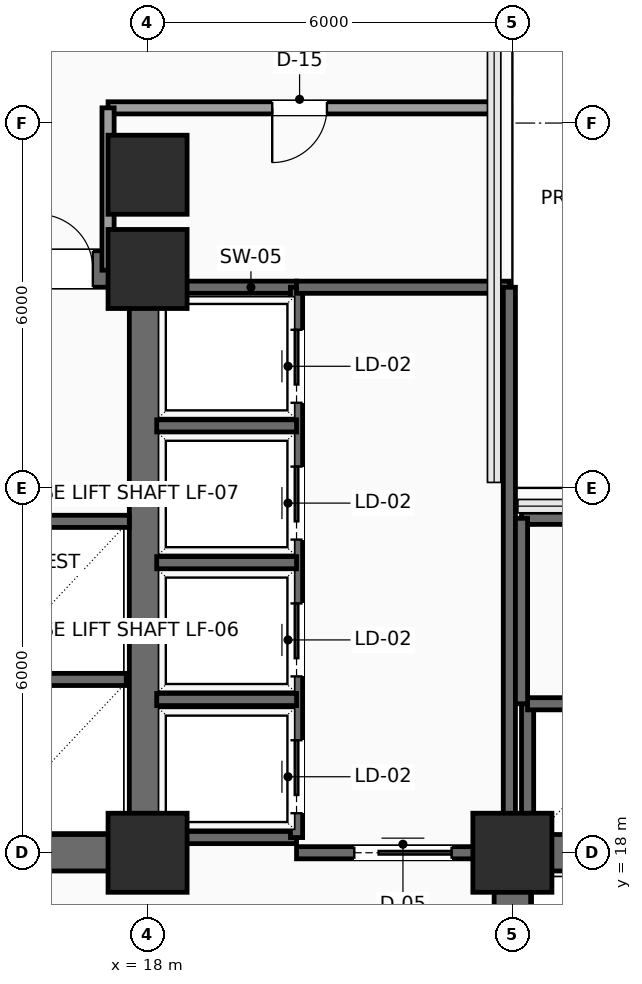
"""IFC4 building model, lengths in metres.
Left out: names, types, materials, properties, quantities, classifications, styles, units other than length and angle.
Written with IfcOpenShell. Run it as: python <this file> out.ifc"""

import sys

from ifc_helpers import new_model, si_unit, direction, frame, frame_2d, origin, origin_2d, place, context, subcontext, project, spatial, rectangle, extrude, element, fill, save


model = new_model("IFC4")
c1 = context("Model", 3, precision=1e-05, world=origin(), true_north=direction((0.0, 1.0)))
c2 = subcontext(c1, "Body", "Model", "MODEL_VIEW")
j1 = project(units=[si_unit("LENGTHUNIT", "METRE"), si_unit("PLANEANGLEUNIT", "RADIAN")], contexts=[c1])
p1 = place(None, origin())
s1 = spatial("IfcSite", under=j1, at=p1, CompositionType="ELEMENT")
p2 = place(p1, origin())
s2 = spatial("IfcBuilding", under=s1, at=p2, CompositionType="ELEMENT")
p3 = place(p2, frame((0.0, 0.0, 90.9)))
s3 = spatial("IfcBuildingStorey", under=s2, at=p3, CompositionType="ELEMENT", Elevation=90.9)
for number, where, z_axis, x_axis in (
    (1, (18.0, 18.0, 0.0), (0.0, 0.0, 1.0), (1.0, 0.0, 0.0)),
    (2, (18.0, 27.6, 0.0), (0.0, 0.0, 1.0), (1.0, 0.0, 0.0)),
    (3, (24.0, 18.0, 0.0), (0.0, 0.0, 1.0), (1.0, 0.0, 0.0)),
    (4, (18.0, 29.15, 0.0), (0.0, 0.0, 1.0), (1.0, 0.0, 0.0)),
):
    element("IfcColumn", number, at=place(p3, frame(where, z_axis=z_axis, x_axis=x_axis)), inside=s3, PredefinedType="COLUMN", context=c2, shape_type="SweptSolid", body=[
        extrude(rectangle(XDim=1.3, YDim=1.3, at=origin_2d()), origin(), (0.0, 0.0, 1.0), 3.9),
    ])
p4 = place(p3, frame((6.0, 18.0, 0.0), z_axis=(0.0, 0.0, 1.0), x_axis=(1.0, 0.0, 0.0)))
e5 = element("IfcWall", 5, at=p4, inside=s3, PredefinedType="SHEAR", context=c2, shape_type="SweptSolid", body=[
    extrude(rectangle(XDim=12.0, YDim=0.6, at=frame_2d((6.0, 0.0))), origin(), (0.0, 0.0, 1.0), 3.575),
])
p5 = place(p4, frame((7.15, 0.0, 0.0)))
e6 = element("IfcOpeningElement", 6, at=p5, cuts=e5, PredefinedType="OPENING", context=c2, shape_type="SweptSolid", body=[
    extrude(rectangle(XDim=1.6, YDim=2.3, at=frame_2d((0.8, 1.15))), frame((0.0, 0.31, 0.0), z_axis=(0.0, -1.0, 0.0), x_axis=(1.0, 0.0, 0.0)), (0.0, 0.0, 1.0), 0.62),
])
p6 = place(p3, frame((6.0, 27.6, 0.0), z_axis=(0.0, 0.0, 1.0), x_axis=(1.0, 0.0, 0.0)))
e7 = element("IfcWall", 7, at=p6, inside=s3, PredefinedType="SHEAR", context=c2, shape_type="SweptSolid", body=[
    extrude(rectangle(XDim=12.0, YDim=0.6, at=frame_2d((6.0, 0.0))), origin(), (0.0, 0.0, 1.0), 3.575),
])
p7 = place(p6, frame((10.2, 0.0, 0.0)))
e8 = element("IfcOpeningElement", 8, at=p7, cuts=e7, PredefinedType="OPENING", context=c2, shape_type="SweptSolid", body=[
    extrude(rectangle(XDim=0.9, YDim=2.15, at=frame_2d((0.45, 1.075))), frame((0.0, 0.31, 0.0), z_axis=(0.0, -1.0, 0.0), x_axis=(1.0, 0.0, 0.0)), (0.0, 0.0, 1.0), 0.62),
])
for number, where, z_axis, x_axis in (
    (9, (18.0, 18.0, 0.0), (0.0, 0.0, 1.0), (0.0, 1.0, 0.0)),
    (10, (24.0, 18.0, 0.0), (0.0, 0.0, 1.0), (1.0, 0.0, 0.0)),
):
    element("IfcWall", number, at=place(p3, frame(where, z_axis=z_axis, x_axis=x_axis)), inside=s3, PredefinedType="SHEAR", context=c2, shape_type="SweptSolid", body=[
        extrude(rectangle(XDim=9.6, YDim=0.6, at=frame_2d((4.8, 0.0))), origin(), (0.0, 0.0, 1.0), 3.575),
    ])
p8 = place(p3, frame((24.0, 6.0, 0.0), z_axis=(0.0, 0.0, 1.0), x_axis=(0.0, 1.0, 0.0)))
e11 = element("IfcWall", 11, at=p8, inside=s3, PredefinedType="SHEAR", context=c2, shape_type="SweptSolid", body=[
    extrude(rectangle(XDim=12.0, YDim=0.6, at=frame_2d((6.0, 0.0))), origin(), (0.0, 0.0, 1.0), 3.575),
])
p9 = place(p8, frame((7.15, 0.0, 0.0)))
e12 = element("IfcOpeningElement", 12, at=p9, cuts=e11, PredefinedType="OPENING", context=c2, shape_type="SweptSolid", body=[
    extrude(rectangle(XDim=1.6, YDim=2.3, at=frame_2d((0.8, 1.15))), frame((0.0, 0.31, 0.0), z_axis=(0.0, -1.0, 0.0), x_axis=(1.0, 0.0, 0.0)), (0.0, 0.0, 1.0), 0.62),
])
p10 = place(p3, frame((15.25, 20.85, 0.0), z_axis=(0.0, 0.0, 1.0), x_axis=(1.0, 0.0, 0.0)))
e13 = element("IfcWall", 13, at=p10, inside=s3, PredefinedType="SHEAR", context=c2, shape_type="SweptSolid", body=[
    extrude(rectangle(XDim=2.4, YDim=0.2, at=frame_2d((1.2, 0.0))), origin(), (0.0, 0.0, 1.0), 3.575),
])
p11 = place(p3, frame((15.25, 23.45, 0.0), z_axis=(0.0, 0.0, 1.0), x_axis=(1.0, 0.0, 0.0)))
e14 = element("IfcWall", 14, at=p11, inside=s3, PredefinedType="SHEAR", context=c2, shape_type="SweptSolid", body=[
    extrude(rectangle(XDim=2.45, YDim=0.2, at=frame_2d((1.225, 0.0))), origin(), (0.0, 0.0, 1.0), 3.575),
])
for number, where, z_axis, x_axis in (
    (15, (18.1, 27.3, 0.0), (0.0, 0.0, 1.0), (1.0, 0.0, 0.0)),
    (16, (18.1, 18.25, 0.0), (0.0, 0.0, 1.0), (1.0, 0.0, 0.0)),
):
    element("IfcWall", number, at=place(p3, frame(where, z_axis=z_axis, x_axis=x_axis)), inside=s3, PredefinedType="SHEAR", context=c2, shape_type="SweptSolid", body=[
        extrude(rectangle(XDim=2.35, YDim=0.2, at=frame_2d((1.175, 0.0))), origin(), (0.0, 0.0, 1.0), 3.575),
    ])
p12 = place(p3, frame((20.45, 18.25, 0.0), z_axis=(0.0, 0.0, 1.0), x_axis=(0.0, 1.0, 0.0)))
e17 = element("IfcWall", 17, at=p12, inside=s3, PredefinedType="SHEAR", context=c2, shape_type="SweptSolid", body=[
    extrude(rectangle(XDim=9.05, YDim=0.2, at=frame_2d((4.525, 0.0))), origin(), (0.0, 0.0, 1.0), 3.575),
])
p13 = place(p12, frame((0.4, 0.0, 0.0)))
e18 = element("IfcOpeningElement", 18, at=p13, cuts=e17, PredefinedType="OPENING", context=c2, shape_type="SweptSolid", body=[
    extrude(rectangle(XDim=1.2, YDim=2.2, at=frame_2d((0.6, 1.1))), frame((0.0, 0.11, 0.0), z_axis=(0.0, -1.0, 0.0), x_axis=(1.0, 0.0, 0.0)), (0.0, 0.0, 1.0), 0.22),
])
p14 = place(p12, frame((2.65, 0.0, 0.0)))
e19 = element("IfcOpeningElement", 19, at=p14, cuts=e17, PredefinedType="OPENING", context=c2, shape_type="SweptSolid", body=[
    extrude(rectangle(XDim=1.2, YDim=2.2, at=frame_2d((0.6, 1.1))), frame((0.0, 0.11, 0.0), z_axis=(0.0, -1.0, 0.0), x_axis=(1.0, 0.0, 0.0)), (0.0, 0.0, 1.0), 0.22),
])
p15 = place(p12, frame((4.9, 0.0, 0.0)))
e20 = element("IfcOpeningElement", 20, at=p15, cuts=e17, PredefinedType="OPENING", context=c2, shape_type="SweptSolid", body=[
    extrude(rectangle(XDim=1.2, YDim=2.2, at=frame_2d((0.6, 1.1))), frame((0.0, 0.11, 0.0), z_axis=(0.0, -1.0, 0.0), x_axis=(1.0, 0.0, 0.0)), (0.0, 0.0, 1.0), 0.22),
])
p16 = place(p12, frame((7.15, 0.0, 0.0)))
e21 = element("IfcOpeningElement", 21, at=p16, cuts=e17, PredefinedType="OPENING", context=c2, shape_type="SweptSolid", body=[
    extrude(rectangle(XDim=1.2, YDim=2.2, at=frame_2d((0.6, 1.1))), frame((0.0, 0.11, 0.0), z_axis=(0.0, -1.0, 0.0), x_axis=(1.0, 0.0, 0.0)), (0.0, 0.0, 1.0), 0.22),
])
for number, where, z_axis, x_axis in (
    (22, (18.15, 20.52, 0.0), (0.0, 0.0, 1.0), (1.0, 0.0, 0.0)),
    (23, (18.15, 22.77, 0.0), (0.0, 0.0, 1.0), (1.0, 0.0, 0.0)),
    (24, (18.15, 25.02, 0.0), (0.0, 0.0, 1.0), (1.0, 0.0, 0.0)),
):
    element("IfcWall", number, at=place(p3, frame(where, z_axis=z_axis, x_axis=x_axis)), inside=s3, PredefinedType="SHEAR", context=c2, shape_type="SweptSolid", body=[
        extrude(rectangle(XDim=2.3, YDim=0.2, at=frame_2d((1.15, 0.0))), origin(), (0.0, 0.0, 1.0), 3.575),
    ])
p17 = place(p3, frame((20.45, 18.0, 0.0), z_axis=(0.0, 0.0, 1.0), x_axis=(1.0, 0.0, 0.0)))
e25 = element("IfcWall", 25, at=p17, inside=s3, PredefinedType="SHEAR", context=c2, shape_type="SweptSolid", body=[
    extrude(rectangle(XDim=3.5, YDim=0.2, at=frame_2d((1.75, 0.0))), origin(), (0.0, 0.0, 1.0), 3.575),
])
p18 = place(p17, frame((0.95, 0.0, 0.0)))
e26 = element("IfcOpeningElement", 26, at=p18, cuts=e25, PredefinedType="OPENING", context=c2, shape_type="SweptSolid", body=[
    extrude(rectangle(XDim=1.6, YDim=2.3, at=frame_2d((0.8, 1.15))), frame((0.0, 0.11, 0.0), z_axis=(0.0, -1.0, 0.0), x_axis=(1.0, 0.0, 0.0)), (0.0, 0.0, 1.0), 0.22),
])
p19 = place(p3, frame((20.45, 27.3, 0.0), z_axis=(0.0, 0.0, 1.0), x_axis=(1.0, 0.0, 0.0)))
e27 = element("IfcWall", 27, at=p19, inside=s3, PredefinedType="SHEAR", context=c2, shape_type="SweptSolid", body=[
    extrude(rectangle(XDim=3.5, YDim=0.2, at=frame_2d((1.75, 0.0))), origin(), (0.0, 0.0, 1.0), 3.575),
])
p20 = place(p3, frame((23.95, 18.0, 0.0), z_axis=(0.0, 0.0, 1.0), x_axis=(0.0, 1.0, 0.0)))
e28 = element("IfcWall", 28, at=p20, inside=s3, PredefinedType="SHEAR", context=c2, shape_type="SweptSolid", body=[
    extrude(rectangle(XDim=9.3, YDim=0.2, at=frame_2d((4.65, 0.0))), origin(), (0.0, 0.0, 1.0), 3.575),
])
p21 = place(p3, frame((24.25, 18.1, 0.0), z_axis=(0.0, 0.0, 1.0), x_axis=(0.0, 1.0, 0.0)))
e29 = element("IfcWall", 29, at=p21, inside=s3, PredefinedType="SHEAR", context=c2, shape_type="SweptSolid", body=[
    extrude(rectangle(XDim=2.35, YDim=0.2, at=frame_2d((1.175, 0.0))), origin(), (0.0, 0.0, 1.0), 3.575),
])
p22 = place(p3, frame((24.25, 20.45, 0.0), z_axis=(0.0, 0.0, 1.0), x_axis=(1.0, 0.0, 0.0)))
e30 = element("IfcWall", 30, at=p22, inside=s3, PredefinedType="SHEAR", context=c2, shape_type="SweptSolid", body=[
    extrude(rectangle(XDim=9.05, YDim=0.2, at=frame_2d((4.525, 0.0))), origin(), (0.0, 0.0, 1.0), 3.575),
])
p23 = place(p3, frame((24.15, 23.5, 0.0), z_axis=(0.0, 0.0, 1.0), x_axis=(1.0, 0.0, 0.0)))
e31 = element("IfcWall", 31, at=p23, inside=s3, PredefinedType="SHEAR", context=c2, shape_type="SweptSolid", body=[
    extrude(rectangle(XDim=9.15, YDim=0.2, at=frame_2d((4.575, 0.0))), origin(), (0.0, 0.0, 1.0), 3.575),
])
p24 = place(p3, frame((24.15, 20.45, 0.0), z_axis=(0.0, 0.0, 1.0), x_axis=(0.0, 1.0, 0.0)))
e32 = element("IfcWall", 32, at=p24, inside=s3, PredefinedType="SHEAR", context=c2, shape_type="SweptSolid", body=[
    extrude(rectangle(XDim=3.05, YDim=0.2, at=frame_2d((1.525, 0.0))), origin(), (0.0, 0.0, 1.0), 3.575),
])
p25 = place(p3, frame((23.7, 30.25, 0.0), z_axis=(0.0, 0.0, 1.0), x_axis=(-1.0, 0.0, 0.0)))
e33 = element("IfcWall", 33, at=p25, inside=s3, PredefinedType="SOLIDWALL", context=c2, shape_type="SweptSolid", body=[
    extrude(rectangle(XDim=6.35, YDim=0.2, at=frame_2d((3.175, 0.0))), origin(), (0.0, 0.0, 1.0), 3.575),
])
p26 = place(p25, frame((2.75, 0.0, 0.0)))
e34 = element("IfcOpeningElement", 34, at=p26, cuts=e33, PredefinedType="OPENING", context=c2, shape_type="SweptSolid", body=[
    extrude(rectangle(XDim=0.9, YDim=2.1, at=frame_2d((0.45, 1.05))), frame((0.0, 0.11, 0.0), z_axis=(0.0, -1.0, 0.0), x_axis=(1.0, 0.0, 0.0)), (0.0, 0.0, 1.0), 0.22),
])
p27 = place(p3, frame((17.35, 30.25, 0.0), z_axis=(0.0, 0.0, 1.0), x_axis=(0.0, -1.0, 0.0)))
e35 = element("IfcWall", 35, at=p27, inside=s3, PredefinedType="SOLIDWALL", context=c2, shape_type="SweptSolid", body=[
    extrude(rectangle(XDim=2.67, YDim=0.2, at=frame_2d((1.335, 0.0))), origin(), (0.0, 0.0, 1.0), 3.575),
])
p28 = place(p7, origin())
e36 = element("IfcDoor", 36, at=p28, inside=s3, OperationType="SINGLE_SWING_LEFT", PredefinedType="DOOR", context=c2, shape_type="SweptSolid", body=[
    extrude(rectangle(XDim=0.9, YDim=2.15, at=frame_2d((0.45, 1.075))), frame((0.0, 0.025, 0.0), z_axis=(0.0, -1.0, 0.0), x_axis=(1.0, 0.0, 0.0)), (0.0, 0.0, 1.0), 0.05),
])
fill(e8, e36)
p29 = place(p13, origin())
e37 = element("IfcDoor", 37, at=p29, inside=s3, OperationType="SLIDING_TO_RIGHT", PredefinedType="DOOR", context=c2, shape_type="SweptSolid", body=[
    extrude(rectangle(XDim=1.2, YDim=2.2, at=frame_2d((0.6, 1.1))), frame((0.0, 0.025, 0.0), z_axis=(0.0, -1.0, 0.0), x_axis=(1.0, 0.0, 0.0)), (0.0, 0.0, 1.0), 0.05),
])
fill(e18, e37)
p30 = place(p14, origin())
e38 = element("IfcDoor", 38, at=p30, inside=s3, OperationType="SLIDING_TO_RIGHT", PredefinedType="DOOR", context=c2, shape_type="SweptSolid", body=[
    extrude(rectangle(XDim=1.2, YDim=2.2, at=frame_2d((0.6, 1.1))), frame((0.0, 0.025, 0.0), z_axis=(0.0, -1.0, 0.0), x_axis=(1.0, 0.0, 0.0)), (0.0, 0.0, 1.0), 0.05),
])
fill(e19, e38)
p31 = place(p15, origin())
e39 = element("IfcDoor", 39, at=p31, inside=s3, OperationType="SLIDING_TO_RIGHT", PredefinedType="DOOR", context=c2, shape_type="SweptSolid", body=[
    extrude(rectangle(XDim=1.2, YDim=2.2, at=frame_2d((0.6, 1.1))), frame((0.0, 0.025, 0.0), z_axis=(0.0, -1.0, 0.0), x_axis=(1.0, 0.0, 0.0)), (0.0, 0.0, 1.0), 0.05),
])
fill(e20, e39)
p32 = place(p16, origin())
e40 = element("IfcDoor", 40, at=p32, inside=s3, OperationType="SLIDING_TO_RIGHT", PredefinedType="DOOR", context=c2, shape_type="SweptSolid", body=[
    extrude(rectangle(XDim=1.2, YDim=2.2, at=frame_2d((0.6, 1.1))), frame((0.0, 0.025, 0.0), z_axis=(0.0, -1.0, 0.0), x_axis=(1.0, 0.0, 0.0)), (0.0, 0.0, 1.0), 0.05),
])
fill(e21, e40)
p33 = place(p18, origin())
e41 = element("IfcDoor", 41, at=p33, inside=s3, OperationType="DOUBLE_DOOR_SLIDING", PredefinedType="DOOR", context=c2, shape_type="SweptSolid", body=[
    extrude(rectangle(XDim=1.6, YDim=2.3, at=frame_2d((0.8, 1.15))), frame((0.0, 0.025, 0.0), z_axis=(0.0, -1.0, 0.0), x_axis=(1.0, 0.0, 0.0)), (0.0, 0.0, 1.0), 0.05),
])
fill(e26, e41)
p34 = place(p26, origin())
e42 = element("IfcDoor", 42, at=p34, inside=s3, OperationType="SINGLE_SWING_RIGHT", PredefinedType="DOOR", context=c2, shape_type="SweptSolid", body=[
    extrude(rectangle(XDim=0.9, YDim=2.1, at=frame_2d((0.45, 1.05))), frame((0.0, 0.025, 0.0), z_axis=(0.0, -1.0, 0.0), x_axis=(1.0, 0.0, 0.0)), (0.0, 0.0, 1.0), 0.05),
])
fill(e34, e42)
save(model, sys.argv[1])
